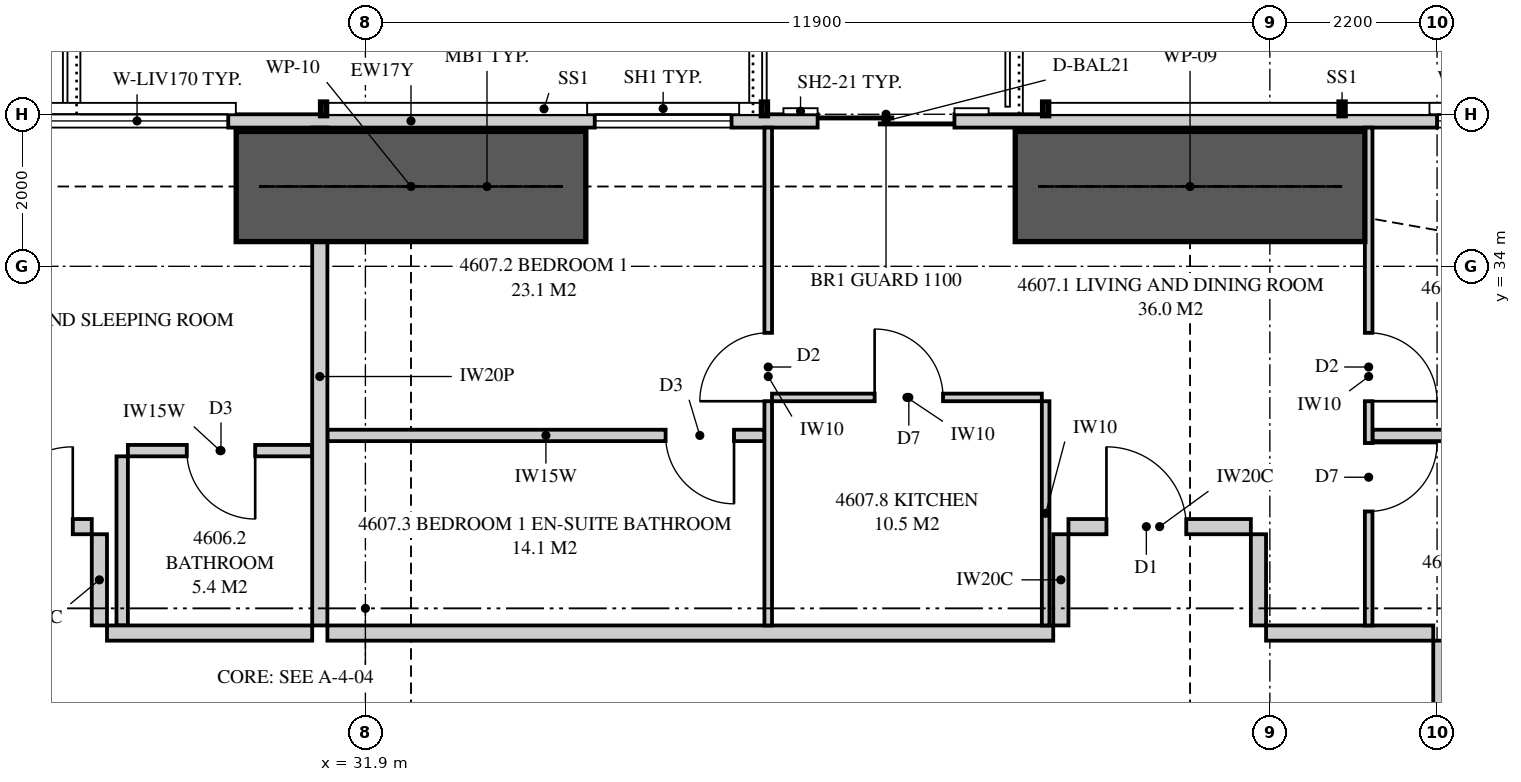
"""IFC4 building model, lengths in metres.
Left out: names, types, materials, properties, quantities, classifications, styles, units other than length and angle.
Written with IfcOpenShell. Run it as: python <this file> out.ifc"""

import sys

from ifc_helpers import new_model, si_unit, direction, frame, frame_2d, origin, place, context, subcontext, project, spatial, polyline, rectangle, outline, extrude, element, fill, save


model = new_model("IFC4")
c1 = context("Model", 3, precision=1e-05, world=origin(), true_north=direction((0.0, 1.0)))
c2 = subcontext(c1, "Body", "Model", "MODEL_VIEW")
j1 = project(units=[si_unit("LENGTHUNIT", "METRE"), si_unit("PLANEANGLEUNIT", "RADIAN")], contexts=[c1])
p1 = place(None, origin())
s1 = spatial("IfcSite", under=j1, at=p1, CompositionType="ELEMENT")
p2 = place(p1, origin())
s2 = spatial("IfcBuilding", under=s1, at=p2, CompositionType="ELEMENT")
p3 = place(p2, frame((0.0, 0.0, 171.1)))
s3 = spatial("IfcBuildingStorey", under=s2, at=p3, CompositionType="ELEMENT", Elevation=171.1)
p4 = place(p3, frame((49.949, 35.913, 0.0), z_axis=(0.0, 0.0, 1.0), x_axis=(-1.0, 0.0, 0.0)))
e1 = element("IfcWall", 1, at=p4, inside=s3, PredefinedType="SOLIDWALL", context=c2, shape_type="SweptSolid", body=[
    extrude(outline(polyline([(0.0, 0.0), (34.897, 0.0), (34.897, 3.11), (27.91, 3.11), (27.91, 2.15), (27.836, 2.15), (27.836, 3.11), (27.699, 3.11), (27.699, 2.15), (7.199, 2.15), (7.199, 3.11), (7.062, 3.11), (7.062, 2.15), (6.987, 2.15), (6.987, 3.11), (0.0, 3.11), (0.0, 0.0)])), frame((0.0, 0.087, 0.0), z_axis=(0.0, -1.0, 0.0), x_axis=(1.0, 0.0, 0.0)), (0.0, 0.0, 1.0), 0.175),
])
p5 = place(p4, frame((2.149, 0.0, 0.4)))
e2 = element("IfcOpeningElement", 2, at=p5, cuts=e1, PredefinedType="OPENING", context=c2, shape_type="SweptSolid", body=[
    extrude(rectangle(XDim=1.8, YDim=1.7, at=frame_2d((0.9, 0.85))), frame((0.0, 0.097, 0.0), z_axis=(0.0, -1.0, 0.0), x_axis=(1.0, 0.0, 0.0)), (0.0, 0.0, 1.0), 0.195),
])
p6 = place(p4, frame((10.299, 0.0, 0.0)))
e3 = element("IfcOpeningElement", 3, at=p6, cuts=e1, PredefinedType="OPENING", context=c2, shape_type="SweptSolid", body=[
    extrude(rectangle(XDim=1.8, YDim=2.1, at=frame_2d((0.9, 1.05))), frame((0.0, 0.097, 0.0), z_axis=(0.0, -1.0, 0.0), x_axis=(1.0, 0.0, 0.0)), (0.0, 0.0, 1.0), 0.195),
])
p7 = place(p4, frame((13.231, 0.0, 0.4)))
e4 = element("IfcOpeningElement", 4, at=p7, cuts=e1, PredefinedType="OPENING", context=c2, shape_type="SweptSolid", body=[
    extrude(rectangle(XDim=1.8, YDim=1.7, at=frame_2d((0.9, 0.85))), frame((0.0, 0.097, 0.0), z_axis=(0.0, -1.0, 0.0), x_axis=(1.0, 0.0, 0.0)), (0.0, 0.0, 1.0), 0.195),
])
p8 = place(p4, frame((22.699, 0.0, 0.0)))
e5 = element("IfcOpeningElement", 5, at=p8, cuts=e1, PredefinedType="OPENING", context=c2, shape_type="SweptSolid", body=[
    extrude(rectangle(XDim=1.8, YDim=2.1, at=frame_2d((0.9, 1.05))), frame((0.0, 0.097, 0.0), z_axis=(0.0, -1.0, 0.0), x_axis=(1.0, 0.0, 0.0)), (0.0, 0.0, 1.0), 0.195),
])
p9 = place(p4, frame((19.853, 0.0, 0.4)))
e6 = element("IfcOpeningElement", 6, at=p9, cuts=e1, PredefinedType="OPENING", context=c2, shape_type="SweptSolid", body=[
    extrude(rectangle(XDim=2.4, YDim=1.7, at=frame_2d((1.2, 0.85))), frame((0.0, 0.097, 0.0), z_axis=(0.0, -1.0, 0.0), x_axis=(1.0, 0.0, 0.0)), (0.0, 0.0, 1.0), 0.195),
])
p10 = place(p4, frame((30.104, 0.0, 0.4)))
e7 = element("IfcOpeningElement", 7, at=p10, cuts=e1, PredefinedType="OPENING", context=c2, shape_type="SweptSolid", body=[
    extrude(rectangle(XDim=2.4, YDim=1.7, at=frame_2d((1.2, 0.85))), frame((0.0, 0.097, 0.0), z_axis=(0.0, -1.0, 0.0), x_axis=(1.0, 0.0, 0.0)), (0.0, 0.0, 1.0), 0.195),
])
p11 = place(p3, frame((31.3, 35.825, 0.0), z_axis=(0.0, 0.0, 1.0), x_axis=(0.0, -1.0, 0.0)))
e8 = element("IfcWall", 8, at=p11, inside=s3, PredefinedType="PARTITIONING", context=c2, shape_type="SweptSolid", body=[
    extrude(outline(polyline([(0.529, 2.15), (0.0, 2.15), (0.0, 0.0), (0.529, 0.0), (0.529, 0.541), (1.021, 0.541), (1.021, 0.0), (6.55, 0.0), (6.55, 3.11), (1.685, 3.11), (1.685, 2.15), (1.021, 2.15), (1.021, 1.608), (0.529, 1.608), (0.529, 2.15)])), frame((0.0, 0.1, 0.0), z_axis=(0.0, -1.0, 0.0), x_axis=(1.0, 0.0, 0.0)), (0.0, 0.0, 1.0), 0.2),
])
p12 = place(p3, frame((28.775, 31.575, 0.0), z_axis=(0.0, 0.0, 1.0), x_axis=(1.0, 0.0, 0.0)))
e9 = element("IfcWall", 9, at=p12, inside=s3, PredefinedType="PLUMBINGWALL", context=c2, shape_type="SweptSolid", body=[
    extrude(rectangle(XDim=2.425, YDim=0.15, at=frame_2d((1.212, 0.0))), origin(), (0.0, 0.0, 1.0), 3.11),
])
p13 = place(p12, frame((0.775, 0.0, 0.0)))
e10 = element("IfcOpeningElement", 10, at=p13, cuts=e9, PredefinedType="OPENING", context=c2, shape_type="SweptSolid", body=[
    extrude(rectangle(XDim=0.9, YDim=2.1, at=frame_2d((0.45, 1.05))), frame((0.0, 0.085, 0.0), z_axis=(0.0, -1.0, 0.0), x_axis=(1.0, 0.0, 0.0)), (0.0, 0.0, 1.0), 0.17),
])
p14 = place(p3, frame((28.7, 31.5, 0.0), z_axis=(0.0, 0.0, 1.0), x_axis=(0.0, -1.0, 0.0)))
e11 = element("IfcWall", 11, at=p14, inside=s3, PredefinedType="PLUMBINGWALL", context=c2, shape_type="SweptSolid", body=[
    extrude(rectangle(XDim=2.225, YDim=0.15, at=frame_2d((1.113, 0.0))), origin(), (0.0, 0.0, 1.0), 3.11),
])
p15 = place(p3, frame((31.4, 29.175, 0.0), z_axis=(0.0, 0.0, 1.0), x_axis=(1.0, 0.0, 0.0)))
e12 = element("IfcWall", 12, at=p15, inside=s3, PredefinedType="PARTITIONING", context=c2, shape_type="SweptSolid", body=[
    extrude(outline(polyline([(0.0, 0.0), (9.55, 0.0), (9.55, 3.11), (1.437, 3.11), (1.437, 2.541), (0.763, 2.541), (0.763, 3.11), (0.0, 3.11), (0.0, 0.0)])), frame((0.0, 0.1, 0.0), z_axis=(0.0, -1.0, 0.0), x_axis=(1.0, 0.0, 0.0)), (0.0, 0.0, 1.0), 0.2),
])
p16 = place(p3, frame((37.2, 35.825, 0.0), z_axis=(0.0, 0.0, 1.0), x_axis=(0.0, -1.0, 0.0)))
e13 = element("IfcWall", 13, at=p16, inside=s3, PredefinedType="PARTITIONING", context=c2, shape_type="SweptSolid", body=[
    extrude(outline(polyline([(0.0, 0.0), (6.55, 0.0), (6.55, 3.11), (1.635, 3.11), (1.635, 2.15), (0.0, 2.15), (0.0, 3.11), (0.0, 0.0)])), frame((0.0, 0.05, 0.0), z_axis=(0.0, -1.0, 0.0), x_axis=(1.0, 0.0, 0.0)), (0.0, 0.0, 1.0), 0.1),
])
p17 = place(p16, frame((2.7, 0.0, 0.0)))
e14 = element("IfcOpeningElement", 14, at=p17, cuts=e13, PredefinedType="OPENING", context=c2, shape_type="SweptSolid", body=[
    extrude(rectangle(XDim=0.9, YDim=2.1, at=frame_2d((0.45, 1.05))), frame((0.0, 0.06, 0.0), z_axis=(0.0, -1.0, 0.0), x_axis=(1.0, 0.0, 0.0)), (0.0, 0.0, 1.0), 0.12),
])
p18 = place(p3, frame((45.1, 35.825, 0.0), z_axis=(0.0, 0.0, 1.0), x_axis=(0.0, -1.0, 0.0)))
e15 = element("IfcWall", 15, at=p18, inside=s3, PredefinedType="PARTITIONING", context=c2, shape_type="SweptSolid", body=[
    extrude(outline(polyline([(0.0, 0.0), (6.55, 0.0), (6.55, 3.11), (2.064, 3.11), (2.064, 2.15), (0.318, 2.15), (0.318, 3.11), (0.0, 3.11), (0.0, 0.0)])), frame((0.0, 0.05, 0.0), z_axis=(0.0, -1.0, 0.0), x_axis=(1.0, 0.0, 0.0)), (0.0, 0.0, 1.0), 0.1),
])
p19 = place(p18, frame((2.7, 0.0, 0.0)))
e16 = element("IfcOpeningElement", 16, at=p19, cuts=e15, PredefinedType="OPENING", context=c2, shape_type="SweptSolid", body=[
    extrude(rectangle(XDim=0.9, YDim=2.1, at=frame_2d((0.45, 1.05))), frame((0.0, 0.06, 0.0), z_axis=(0.0, -1.0, 0.0), x_axis=(1.0, 0.0, 0.0)), (0.0, 0.0, 1.0), 0.12),
])
p20 = place(p18, frame((4.15, 0.0, 0.0)))
e17 = element("IfcOpeningElement", 17, at=p20, cuts=e15, PredefinedType="OPENING", context=c2, shape_type="SweptSolid", body=[
    extrude(rectangle(XDim=0.9, YDim=2.1, at=frame_2d((0.45, 1.05))), frame((0.0, 0.06, 0.0), z_axis=(0.0, -1.0, 0.0), x_axis=(1.0, 0.0, 0.0)), (0.0, 0.0, 1.0), 0.12),
])
p21 = place(p3, frame((31.4, 31.775, 0.0), z_axis=(0.0, 0.0, 1.0), x_axis=(1.0, 0.0, 0.0)))
e18 = element("IfcWall", 18, at=p21, inside=s3, PredefinedType="PLUMBINGWALL", context=c2, shape_type="SweptSolid", body=[
    extrude(outline(polyline([(0.0, 0.0), (5.75, 0.0), (5.75, 3.11), (1.412, 3.11), (1.412, 2.541), (0.788, 2.541), (0.788, 3.11), (0.0, 3.11), (0.0, 0.0)])), frame((0.0, 0.075, 0.0), z_axis=(0.0, -1.0, 0.0), x_axis=(1.0, 0.0, 0.0)), (0.0, 0.0, 1.0), 0.15),
])
p22 = place(p21, frame((4.45, 0.0, 0.0)))
e19 = element("IfcOpeningElement", 19, at=p22, cuts=e18, PredefinedType="OPENING", context=c2, shape_type="SweptSolid", body=[
    extrude(rectangle(XDim=0.9, YDim=2.1, at=frame_2d((0.45, 1.05))), frame((0.0, 0.085, 0.0), z_axis=(0.0, -1.0, 0.0), x_axis=(1.0, 0.0, 0.0)), (0.0, 0.0, 1.0), 0.17),
])
p23 = place(p3, frame((45.15, 31.775, 0.0), z_axis=(0.0, 0.0, 1.0), x_axis=(1.0, 0.0, 0.0)))
e20 = element("IfcWall", 20, at=p23, inside=s3, PredefinedType="PLUMBINGWALL", context=c2, shape_type="SweptSolid", body=[
    extrude(rectangle(XDim=3.5, YDim=0.15, at=frame_2d((1.75, 0.0))), origin(), (0.0, 0.0, 1.0), 3.11),
])
p24 = place(p3, frame((37.25, 32.275, 0.0), z_axis=(0.0, 0.0, 1.0), x_axis=(1.0, 0.0, 0.0)))
e21 = element("IfcWall", 21, at=p24, inside=s3, PredefinedType="PARTITIONING", context=c2, shape_type="SweptSolid", body=[
    extrude(rectangle(XDim=3.55, YDim=0.1, at=frame_2d((1.775, 0.0))), origin(), (0.0, 0.0, 1.0), 3.11),
])
p25 = place(p24, frame((1.35, 0.0, 0.0)))
e22 = element("IfcOpeningElement", 22, at=p25, cuts=e21, PredefinedType="OPENING", context=c2, shape_type="SweptSolid", body=[
    extrude(rectangle(XDim=0.9, YDim=2.1, at=frame_2d((0.45, 1.05))), frame((0.0, 0.06, 0.0), z_axis=(0.0, -1.0, 0.0), x_axis=(1.0, 0.0, 0.0)), (0.0, 0.0, 1.0), 0.12),
])
p26 = place(p3, frame((40.85, 32.225, 0.0), z_axis=(0.0, 0.0, 1.0), x_axis=(0.0, -1.0, 0.0)))
e23 = element("IfcWall", 23, at=p26, inside=s3, PredefinedType="PARTITIONING", context=c2, shape_type="SweptSolid", body=[
    extrude(rectangle(XDim=2.95, YDim=0.1, at=frame_2d((1.475, 0.0))), origin(), (0.0, 0.0, 1.0), 3.11),
])
p27 = place(p3, frame((46.05, 21.75, 0.0), z_axis=(0.0, 0.0, 1.0), x_axis=(0.0, 1.0, 0.0)))
e24 = element("IfcWall", 24, at=p27, inside=s3, PredefinedType="PARTITIONING", context=c2, shape_type="SweptSolid", body=[
    extrude(outline(polyline([(0.0, 0.0), (7.325, 0.0), (7.325, 3.11), (3.587, 3.11), (3.587, 2.541), (2.913, 2.541), (2.913, 3.11), (0.0, 3.11), (0.0, 0.0)])), frame((0.0, 0.1, 0.0), z_axis=(0.0, -1.0, 0.0), x_axis=(1.0, 0.0, 0.0)), (0.0, 0.0, 1.0), 0.2),
])
p28 = place(p27, frame((3.163, 0.0, 0.0)))
e25 = element("IfcOpeningElement", 25, at=p28, cuts=e24, PredefinedType="OPENING", context=c2, shape_type="SweptSolid", body=[
    extrude(rectangle(XDim=1.05, YDim=2.2, at=frame_2d((0.525, 1.1))), frame((0.0, 0.11, 0.0), z_axis=(0.0, -1.0, 0.0), x_axis=(1.0, 0.0, 0.0)), (0.0, 0.0, 1.0), 0.22),
])
p29 = place(p3, frame((28.5, 29.175, 0.0), z_axis=(0.0, 0.0, 1.0), x_axis=(1.0, 0.0, 0.0)))
e26 = element("IfcWall", 26, at=p29, inside=s3, PredefinedType="PARTITIONING", context=c2, shape_type="SweptSolid", body=[
    extrude(rectangle(XDim=2.7, YDim=0.2, at=frame_2d((1.35, 0.0))), origin(), (0.0, 0.0, 1.0), 3.11),
])
p30 = place(p3, frame((25.9, 30.575, 0.0), z_axis=(0.0, 0.0, 1.0), x_axis=(1.0, 0.0, 0.0)))
e27 = element("IfcWall", 27, at=p30, inside=s3, PredefinedType="PARTITIONING", context=c2, shape_type="SweptSolid", body=[
    extrude(rectangle(XDim=2.4, YDim=0.2, at=frame_2d((1.2, 0.0))), origin(), (0.0, 0.0, 1.0), 3.11),
])
p31 = place(p30, frame((1.1, 0.0, 0.0)))
e28 = element("IfcOpeningElement", 28, at=p31, cuts=e27, PredefinedType="OPENING", context=c2, shape_type="SweptSolid", body=[
    extrude(rectangle(XDim=1.05, YDim=2.2, at=frame_2d((0.525, 1.1))), frame((0.0, 0.11, 0.0), z_axis=(0.0, -1.0, 0.0), x_axis=(1.0, 0.0, 0.0)), (0.0, 0.0, 1.0), 0.22),
])
p32 = place(p3, frame((28.4, 29.275, 0.0), z_axis=(0.0, 0.0, 1.0), x_axis=(0.0, 1.0, 0.0)))
e29 = element("IfcWall", 29, at=p32, inside=s3, PredefinedType="PARTITIONING", context=c2, shape_type="SweptSolid", body=[
    extrude(rectangle(XDim=1.2, YDim=0.2, at=frame_2d((0.6, 0.0))), origin(), (0.0, 0.0, 1.0), 3.11),
])
p33 = place(p3, frame((43.75, 29.175, 0.0), z_axis=(0.0, 0.0, 1.0), x_axis=(1.0, 0.0, 0.0)))
e30 = element("IfcWall", 30, at=p33, inside=s3, PredefinedType="PARTITIONING", context=c2, shape_type="SweptSolid", body=[
    extrude(rectangle(XDim=2.2, YDim=0.2, at=frame_2d((1.1, 0.0))), origin(), (0.0, 0.0, 1.0), 3.11),
])
p34 = place(p3, frame((41.15, 30.575, 0.0), z_axis=(0.0, 0.0, 1.0), x_axis=(1.0, 0.0, 0.0)))
e31 = element("IfcWall", 31, at=p34, inside=s3, PredefinedType="PARTITIONING", context=c2, shape_type="SweptSolid", body=[
    extrude(outline(polyline([(0.0, 0.0), (2.4, 0.0), (2.4, 3.11), (1.938, 3.11), (1.938, 2.541), (1.263, 2.541), (1.263, 3.11), (0.0, 3.11), (0.0, 0.0)])), frame((0.0, 0.1, 0.0), z_axis=(0.0, -1.0, 0.0), x_axis=(1.0, 0.0, 0.0)), (0.0, 0.0, 1.0), 0.2),
])
p35 = place(p34, frame((0.5, 0.0, 0.0)))
e32 = element("IfcOpeningElement", 32, at=p35, cuts=e31, PredefinedType="OPENING", context=c2, shape_type="SweptSolid", body=[
    extrude(rectangle(XDim=1.05, YDim=2.2, at=frame_2d((0.525, 1.1))), frame((0.0, 0.11, 0.0), z_axis=(0.0, -1.0, 0.0), x_axis=(1.0, 0.0, 0.0)), (0.0, 0.0, 1.0), 0.22),
])
for number, where, z_axis, x_axis in (
    (33, (41.05, 29.275, 0.0), (0.0, 0.0, 1.0), (0.0, 1.0, 0.0)),
    (34, (43.65, 29.275, 0.0), (0.0, 0.0, 1.0), (0.0, 1.0, 0.0)),
):
    element("IfcWall", number, at=place(p3, frame(where, z_axis=z_axis, x_axis=x_axis)), inside=s3, PredefinedType="PARTITIONING", context=c2, shape_type="SweptSolid", body=[
        extrude(rectangle(XDim=1.2, YDim=0.2, at=frame_2d((0.6, 0.0))), origin(), (0.0, 0.0, 1.0), 3.11),
    ])
for number, where, z_axis, x_axis in (
    (35, (40.45, 35.05, 0.0), (0.0, 0.0, 1.0), (1.0, 0.0, 0.0)),
    (36, (30.2, 35.05, 0.0), (0.0, 0.0, 1.0), (1.0, 0.0, 0.0)),
):
    element("IfcWall", number, at=place(p3, frame(where, z_axis=z_axis, x_axis=x_axis)), inside=s3, PredefinedType="SHEAR", context=c2, shape_type="SweptSolid", body=[
        extrude(rectangle(XDim=4.6, YDim=1.45, at=frame_2d((2.3, 0.0))), origin(), (0.0, 0.0, 1.0), 3.35),
    ])
p36 = place(p5, origin())
e37 = element("IfcWindow", 37, at=p36, inside=s3, PartitioningType="SINGLE_PANEL", PredefinedType="WINDOW", context=c2, shape_type="SweptSolid", body=[
    extrude(rectangle(XDim=1.8, YDim=1.7, at=frame_2d((0.9, 0.85))), frame((0.0, 0.03, 0.0), z_axis=(0.0, -1.0, 0.0), x_axis=(1.0, 0.0, 0.0)), (0.0, 0.0, 1.0), 0.06),
])
fill(e2, e37)
p37 = place(p6, origin())
e38 = element("IfcDoor", 38, at=p37, inside=s3, OperationType="SLIDING_TO_LEFT", PredefinedType="DOOR", context=c2, shape_type="SweptSolid", body=[
    extrude(rectangle(XDim=1.8, YDim=2.1, at=frame_2d((0.9, 1.05))), frame((0.0, 0.025, 0.0), z_axis=(0.0, -1.0, 0.0), x_axis=(1.0, 0.0, 0.0)), (0.0, 0.0, 1.0), 0.05),
])
fill(e3, e38)
p38 = place(p7, origin())
e39 = element("IfcWindow", 39, at=p38, inside=s3, PartitioningType="SINGLE_PANEL", PredefinedType="WINDOW", context=c2, shape_type="SweptSolid", body=[
    extrude(rectangle(XDim=1.8, YDim=1.7, at=frame_2d((0.9, 0.85))), frame((0.0, 0.03, 0.0), z_axis=(0.0, -1.0, 0.0), x_axis=(1.0, 0.0, 0.0)), (0.0, 0.0, 1.0), 0.06),
])
fill(e4, e39)
p39 = place(p9, origin())
e40 = element("IfcWindow", 40, at=p39, inside=s3, PartitioningType="SINGLE_PANEL", PredefinedType="WINDOW", context=c2, shape_type="SweptSolid", body=[
    extrude(rectangle(XDim=2.4, YDim=1.7, at=frame_2d((1.2, 0.85))), frame((0.0, 0.03, 0.0), z_axis=(0.0, -1.0, 0.0), x_axis=(1.0, 0.0, 0.0)), (0.0, 0.0, 1.0), 0.06),
])
fill(e6, e40)
p40 = place(p31, origin())
e41 = element("IfcDoor", 41, at=p40, inside=s3, OperationType="SINGLE_SWING_RIGHT", PredefinedType="DOOR", context=c2, shape_type="SweptSolid", body=[
    extrude(rectangle(XDim=1.05, YDim=2.2, at=frame_2d((0.525, 1.1))), frame((0.0, 0.025, 0.0), z_axis=(0.0, -1.0, 0.0), x_axis=(1.0, 0.0, 0.0)), (0.0, 0.0, 1.0), 0.05),
])
fill(e28, e41)
p41 = place(p13, frame((0.9, 0.0, 0.0), z_axis=(0.0, 0.0, 1.0), x_axis=(-1.0, 0.0, 0.0)))
e42 = element("IfcDoor", 42, at=p41, inside=s3, OperationType="SINGLE_SWING_LEFT", PredefinedType="DOOR", context=c2, shape_type="SweptSolid", body=[
    extrude(rectangle(XDim=0.9, YDim=2.1, at=frame_2d((0.45, 1.05))), frame((0.0, 0.025, 0.0), z_axis=(0.0, -1.0, 0.0), x_axis=(1.0, 0.0, 0.0)), (0.0, 0.0, 1.0), 0.05),
])
fill(e10, e42)
p42 = place(p35, origin())
e43 = element("IfcDoor", 43, at=p42, inside=s3, OperationType="SINGLE_SWING_LEFT", PredefinedType="DOOR", context=c2, shape_type="SweptSolid", body=[
    extrude(rectangle(XDim=1.05, YDim=2.2, at=frame_2d((0.525, 1.1))), frame((0.0, 0.025, 0.0), z_axis=(0.0, -1.0, 0.0), x_axis=(1.0, 0.0, 0.0)), (0.0, 0.0, 1.0), 0.05),
])
fill(e32, e43)
p43 = place(p17, frame((0.9, 0.0, 0.0), z_axis=(0.0, 0.0, 1.0), x_axis=(-1.0, 0.0, 0.0)))
e44 = element("IfcDoor", 44, at=p43, inside=s3, OperationType="SINGLE_SWING_LEFT", PredefinedType="DOOR", context=c2, shape_type="SweptSolid", body=[
    extrude(rectangle(XDim=0.9, YDim=2.1, at=frame_2d((0.45, 1.05))), frame((0.0, 0.025, 0.0), z_axis=(0.0, -1.0, 0.0), x_axis=(1.0, 0.0, 0.0)), (0.0, 0.0, 1.0), 0.05),
])
fill(e14, e44)
p44 = place(p22, frame((0.9, 0.0, 0.0), z_axis=(0.0, 0.0, 1.0), x_axis=(-1.0, 0.0, 0.0)))
e45 = element("IfcDoor", 45, at=p44, inside=s3, OperationType="SINGLE_SWING_LEFT", PredefinedType="DOOR", context=c2, shape_type="SweptSolid", body=[
    extrude(rectangle(XDim=0.9, YDim=2.1, at=frame_2d((0.45, 1.05))), frame((0.0, 0.025, 0.0), z_axis=(0.0, -1.0, 0.0), x_axis=(1.0, 0.0, 0.0)), (0.0, 0.0, 1.0), 0.05),
])
fill(e19, e45)
p45 = place(p19, origin())
e46 = element("IfcDoor", 46, at=p45, inside=s3, OperationType="SINGLE_SWING_RIGHT", PredefinedType="DOOR", context=c2, shape_type="SweptSolid", body=[
    extrude(rectangle(XDim=0.9, YDim=2.1, at=frame_2d((0.45, 1.05))), frame((0.0, 0.025, 0.0), z_axis=(0.0, -1.0, 0.0), x_axis=(1.0, 0.0, 0.0)), (0.0, 0.0, 1.0), 0.05),
])
fill(e16, e46)
p46 = place(p20, origin())
e47 = element("IfcDoor", 47, at=p46, inside=s3, OperationType="SINGLE_SWING_LEFT", PredefinedType="DOOR", context=c2, shape_type="SweptSolid", body=[
    extrude(rectangle(XDim=0.9, YDim=2.1, at=frame_2d((0.45, 1.05))), frame((0.0, 0.025, 0.0), z_axis=(0.0, -1.0, 0.0), x_axis=(1.0, 0.0, 0.0)), (0.0, 0.0, 1.0), 0.05),
])
fill(e17, e47)
p47 = place(p25, origin())
e48 = element("IfcDoor", 48, at=p47, inside=s3, OperationType="SINGLE_SWING_LEFT", PredefinedType="DOOR", context=c2, shape_type="SweptSolid", body=[
    extrude(rectangle(XDim=0.9, YDim=2.1, at=frame_2d((0.45, 1.05))), frame((0.0, 0.025, 0.0), z_axis=(0.0, -1.0, 0.0), x_axis=(1.0, 0.0, 0.0)), (0.0, 0.0, 1.0), 0.05),
])
fill(e22, e48)
save(model, sys.argv[1])
